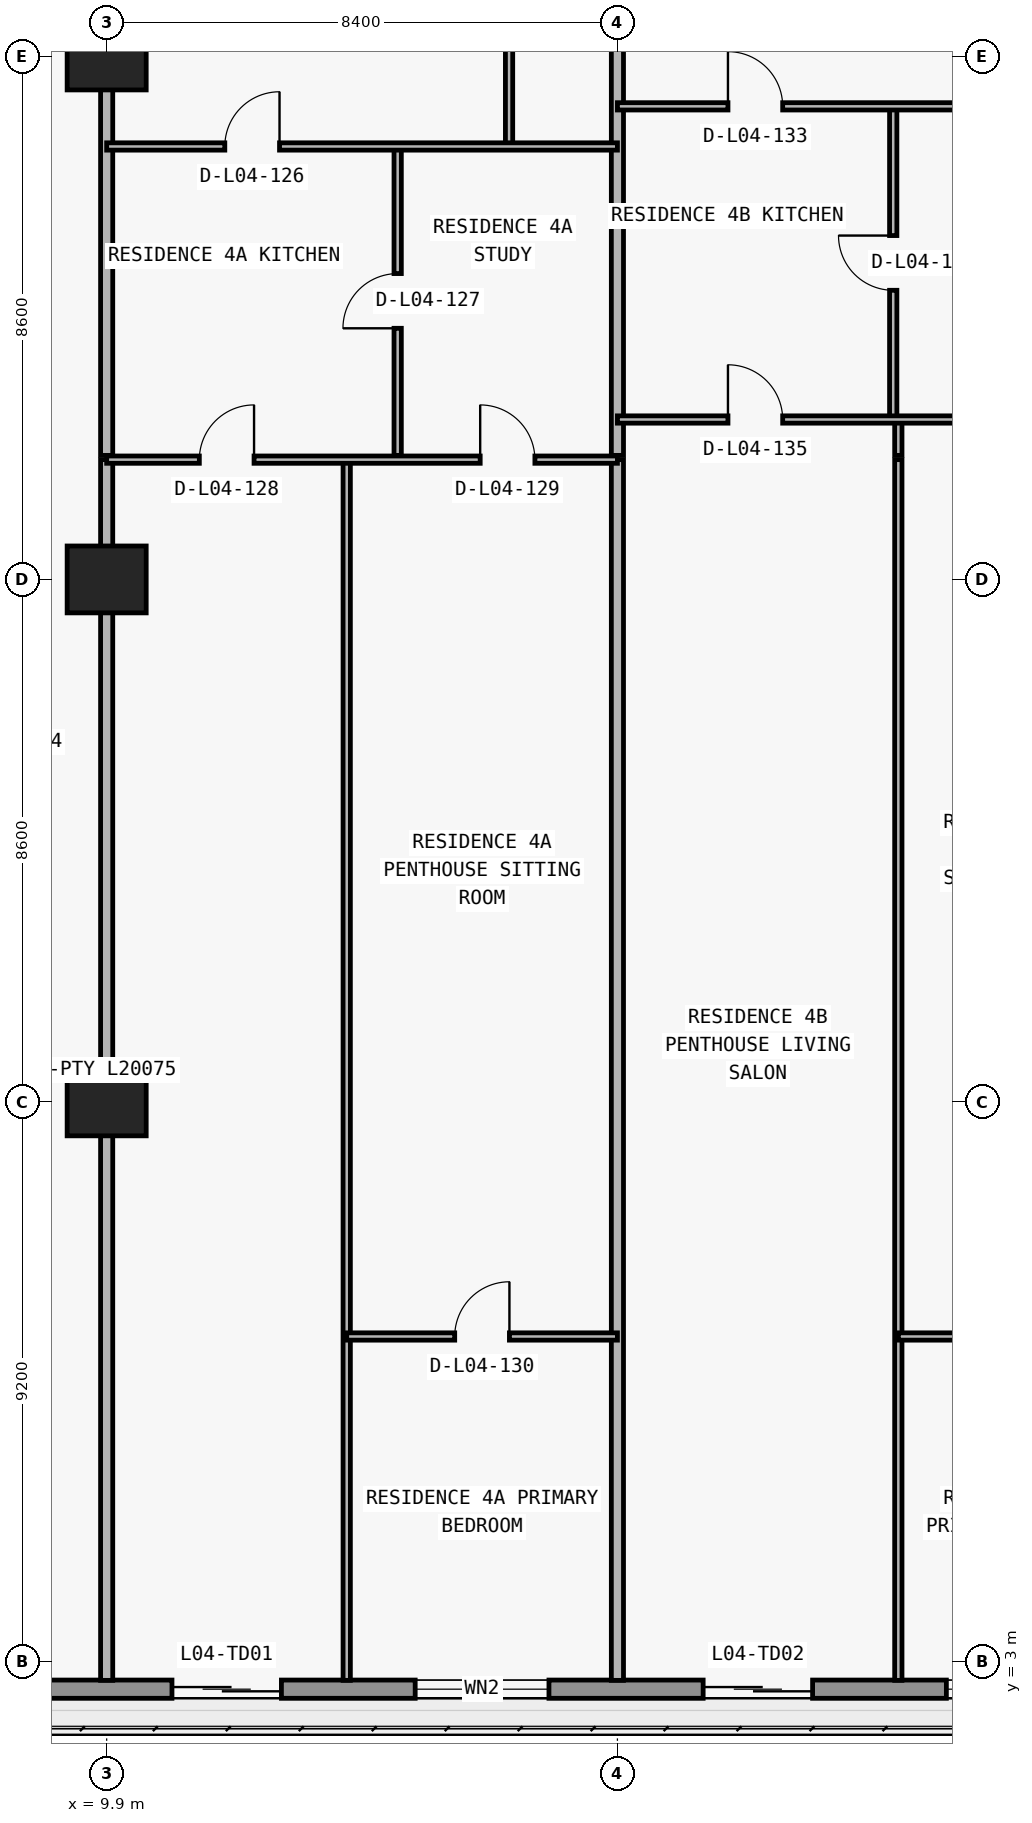
"""IFC4 building model, lengths in metres.
Left out: names, types, materials, properties, quantities, classifications, styles, units other than length and angle.
Written with IfcOpenShell. Run it as: python <this file> out.ifc"""

import sys

from ifc_helpers import new_model, si_unit, direction, frame, frame_2d, origin, origin_2d, place, context, subcontext, project, spatial, rectangle, extrude, element, fill, save


model = new_model("IFC4")
c1 = context("Model", 3, precision=1e-05, world=origin(), true_north=direction((0.0, 1.0)))
c2 = subcontext(c1, "Body", "Model", "MODEL_VIEW")
j1 = project(units=[si_unit("LENGTHUNIT", "METRE"), si_unit("PLANEANGLEUNIT", "RADIAN")], contexts=[c1])
p1 = place(None, origin())
s1 = spatial("IfcSite", under=j1, at=p1, CompositionType="ELEMENT")
p2 = place(p1, origin())
s2 = spatial("IfcBuilding", under=s1, at=p2, CompositionType="ELEMENT")
p3 = place(p2, frame((0.0, 0.0, 19.8)))
s3 = spatial("IfcBuildingStorey", under=s2, at=p3, CompositionType="ELEMENT", Elevation=19.8)
for number, where, z_axis, x_axis in (
    (1, (9.9, 12.2, 0.0), (0.0, 0.0, 1.0), (1.0, 0.0, 0.0)),
    (2, (9.9, 20.8, 0.0), (0.0, 0.0, 1.0), (1.0, 0.0, 0.0)),
    (3, (9.9, 29.4, 0.0), (0.0, 0.0, 1.0), (1.0, 0.0, 0.0)),
):
    element("IfcColumn", number, at=place(p3, frame(where, z_axis=z_axis, x_axis=x_axis)), inside=s3, PredefinedType="COLUMN", context=c2, shape_type="SweptSolid", body=[
        extrude(rectangle(XDim=1.3, YDim=1.1, at=origin_2d()), origin(), (0.0, 0.0, 1.0), 4.45),
    ])
p4 = place(p3, frame((74.15, 2.55, 0.0), z_axis=(0.0, 0.0, 1.0), x_axis=(-1.0, 0.0, 0.0)))
e4 = element("IfcWall", 4, at=p4, inside=s3, PredefinedType="STANDARD", context=c2, shape_type="SweptSolid", body=[
    extrude(rectangle(XDim=70.5, YDim=0.3, at=frame_2d((35.25, 0.0))), origin(), (0.0, 0.0, 1.0), 4.45),
])
p5 = place(p4, frame((65.875, 0.0, 0.85)))
e5 = element("IfcOpeningElement", 5, at=p5, cuts=e4, PredefinedType="OPENING", context=c2, shape_type="SweptSolid", body=[
    extrude(rectangle(XDim=3.0, YDim=2.4, at=frame_2d((1.5, 1.2))), frame((0.0, 0.16, 0.0), z_axis=(0.0, -1.0, 0.0), x_axis=(1.0, 0.0, 0.0)), (0.0, 0.0, 1.0), 0.32),
])
p6 = place(p4, frame((61.376, 0.0, 0.0)))
e6 = element("IfcOpeningElement", 6, at=p6, cuts=e4, PredefinedType="OPENING", context=c2, shape_type="SweptSolid", body=[
    extrude(rectangle(XDim=1.8, YDim=2.3, at=frame_2d((0.9, 1.15))), frame((0.0, 0.16, 0.0), z_axis=(0.0, -1.0, 0.0), x_axis=(1.0, 0.0, 0.0)), (0.0, 0.0, 1.0), 0.32),
])
p7 = place(p4, frame((56.976, 0.0, 0.85)))
e7 = element("IfcOpeningElement", 7, at=p7, cuts=e4, PredefinedType="OPENING", context=c2, shape_type="SweptSolid", body=[
    extrude(rectangle(XDim=2.2, YDim=1.55, at=frame_2d((1.1, 0.775))), frame((0.0, 0.16, 0.0), z_axis=(0.0, -1.0, 0.0), x_axis=(1.0, 0.0, 0.0)), (0.0, 0.0, 1.0), 0.32),
])
p8 = place(p4, frame((52.64, 0.0, 0.0)))
e8 = element("IfcOpeningElement", 8, at=p8, cuts=e4, PredefinedType="OPENING", context=c2, shape_type="SweptSolid", body=[
    extrude(rectangle(XDim=1.8, YDim=2.3, at=frame_2d((0.9, 1.15))), frame((0.0, 0.16, 0.0), z_axis=(0.0, -1.0, 0.0), x_axis=(1.0, 0.0, 0.0)), (0.0, 0.0, 1.0), 0.32),
])
p9 = place(p4, frame((48.24, 0.0, 0.85)))
e9 = element("IfcOpeningElement", 9, at=p9, cuts=e4, PredefinedType="OPENING", context=c2, shape_type="SweptSolid", body=[
    extrude(rectangle(XDim=2.2, YDim=1.55, at=frame_2d((1.1, 0.775))), frame((0.0, 0.16, 0.0), z_axis=(0.0, -1.0, 0.0), x_axis=(1.0, 0.0, 0.0)), (0.0, 0.0, 1.0), 0.32),
])
p10 = place(p4, frame((34.35, 0.0, 0.0)))
e10 = element("IfcOpeningElement", 10, at=p10, cuts=e4, PredefinedType="OPENING", context=c2, shape_type="SweptSolid", body=[
    extrude(rectangle(XDim=1.8, YDim=2.3, at=frame_2d((0.9, 1.15))), frame((0.0, 0.16, 0.0), z_axis=(0.0, -1.0, 0.0), x_axis=(1.0, 0.0, 0.0)), (0.0, 0.0, 1.0), 0.32),
])
p11 = place(p4, frame((17.95, 0.0, 0.0)))
e11 = element("IfcOpeningElement", 11, at=p11, cuts=e4, PredefinedType="OPENING", context=c2, shape_type="SweptSolid", body=[
    extrude(rectangle(XDim=1.8, YDim=2.3, at=frame_2d((0.9, 1.15))), frame((0.0, 0.16, 0.0), z_axis=(0.0, -1.0, 0.0), x_axis=(1.0, 0.0, 0.0)), (0.0, 0.0, 1.0), 0.32),
])
p12 = place(p4, frame((9.35, 0.0, 0.85)))
e12 = element("IfcOpeningElement", 12, at=p12, cuts=e4, PredefinedType="OPENING", context=c2, shape_type="SweptSolid", body=[
    extrude(rectangle(XDim=2.2, YDim=1.55, at=frame_2d((1.1, 0.775))), frame((0.0, 0.16, 0.0), z_axis=(0.0, -1.0, 0.0), x_axis=(1.0, 0.0, 0.0)), (0.0, 0.0, 1.0), 0.32),
])
p13 = place(p4, frame((1.625, 0.0, 0.85)))
e13 = element("IfcOpeningElement", 13, at=p13, cuts=e4, PredefinedType="OPENING", context=c2, shape_type="SweptSolid", body=[
    extrude(rectangle(XDim=3.0, YDim=2.4, at=frame_2d((1.5, 1.2))), frame((0.0, 0.16, 0.0), z_axis=(0.0, -1.0, 0.0), x_axis=(1.0, 0.0, 0.0)), (0.0, 0.0, 1.0), 0.32),
])
p14 = place(p3, frame((9.9, 2.695, 0.0), z_axis=(0.0, 0.0, 1.0), x_axis=(0.0, 1.0, 0.0)))
e14 = element("IfcWall", 14, at=p14, inside=s3, PredefinedType="PARTITIONING", context=c2, shape_type="SweptSolid", body=[
    extrude(rectangle(XDim=20.075, YDim=0.2, at=frame_2d((10.038, 0.0))), origin(), (0.0, 0.0, 1.0), 3.014),
])
p15 = place(p3, frame((9.9, 22.84, 0.0), z_axis=(0.0, 0.0, 1.0), x_axis=(0.0, 1.0, 0.0)))
e15 = element("IfcWall", 15, at=p15, inside=s3, PredefinedType="PARTITIONING", context=c2, shape_type="SweptSolid", body=[
    extrude(rectangle(XDim=10.86, YDim=0.2, at=frame_2d((5.43, 0.0))), origin(), (0.0, 0.0, 1.0), 3.414),
])
p16 = place(p3, frame((13.848, 2.695, 0.0), z_axis=(0.0, 0.0, 1.0), x_axis=(0.0, 1.0, 0.0)))
e16 = element("IfcWall", 16, at=p16, inside=s3, PredefinedType="PARTITIONING", context=c2, shape_type="SweptSolid", body=[
    extrude(rectangle(XDim=20.075, YDim=0.12, at=frame_2d((10.038, 0.0))), origin(), (0.0, 0.0, 1.0), 4.05),
])
p17 = place(p3, frame((14.686, 22.84, 0.0), z_axis=(0.0, 0.0, 1.0), x_axis=(0.0, 1.0, 0.0)))
e17 = element("IfcWall", 17, at=p17, inside=s3, PredefinedType="PARTITIONING", context=c2, shape_type="SweptSolid", body=[
    extrude(rectangle(XDim=5.08, YDim=0.12, at=frame_2d((2.54, 0.0))), origin(), (0.0, 0.0, 1.0), 4.45),
])
p18 = place(p17, frame((2.09, 0.0, 0.0)))
e18 = element("IfcOpeningElement", 18, at=p18, cuts=e17, PredefinedType="OPENING", context=c2, shape_type="SweptSolid", body=[
    extrude(rectangle(XDim=0.9, YDim=2.15, at=frame_2d((0.45, 1.075))), frame((0.0, 0.07, 0.0), z_axis=(0.0, -1.0, 0.0), x_axis=(1.0, 0.0, 0.0)), (0.0, 0.0, 1.0), 0.14),
])
p19 = place(p3, frame((16.518, 27.92, 0.0), z_axis=(0.0, 0.0, 1.0), x_axis=(0.0, 1.0, 0.0)))
e19 = element("IfcWall", 19, at=p19, inside=s3, PredefinedType="PARTITIONING", context=c2, shape_type="SweptSolid", body=[
    extrude(rectangle(XDim=5.78, YDim=0.12, at=frame_2d((2.89, 0.0))), origin(), (0.0, 0.0, 1.0), 3.823),
])
p20 = place(p19, frame((2.465, 0.0, 0.0)))
e20 = element("IfcOpeningElement", 20, at=p20, cuts=e19, PredefinedType="OPENING", context=c2, shape_type="SweptSolid", body=[
    extrude(rectangle(XDim=0.85, YDim=2.1, at=frame_2d((0.425, 1.05))), frame((0.0, 0.07, 0.0), z_axis=(0.0, -1.0, 0.0), x_axis=(1.0, 0.0, 0.0)), (0.0, 0.0, 1.0), 0.14),
])
p21 = place(p3, frame((18.3, 2.695, 0.0), z_axis=(0.0, 0.0, 1.0), x_axis=(0.0, 1.0, 0.0)))
e21 = element("IfcWall", 21, at=p21, inside=s3, PredefinedType="PARTITIONING", context=c2, shape_type="SweptSolid", body=[
    extrude(rectangle(XDim=20.075, YDim=0.2, at=frame_2d((10.038, 0.0))), origin(), (0.0, 0.0, 1.0), 4.05),
])
p22 = place(p3, frame((18.3, 22.84, 0.0), z_axis=(0.0, 0.0, 1.0), x_axis=(0.0, 1.0, 0.0)))
e22 = element("IfcWall", 22, at=p22, inside=s3, PredefinedType="PARTITIONING", context=c2, shape_type="SweptSolid", body=[
    extrude(rectangle(XDim=10.86, YDim=0.2, at=frame_2d((5.43, 0.0))), origin(), (0.0, 0.0, 1.0), 4.45),
])
p23 = place(p3, frame((22.836, 23.43, 0.0), z_axis=(0.0, 0.0, 1.0), x_axis=(0.0, 1.0, 0.0)))
e23 = element("IfcWall", 23, at=p23, inside=s3, PredefinedType="PARTITIONING", context=c2, shape_type="SweptSolid", body=[
    extrude(rectangle(XDim=5.15, YDim=0.12, at=frame_2d((2.575, 0.0))), origin(), (0.0, 0.0, 1.0), 4.45),
])
p24 = place(p23, frame((2.125, 0.0, 0.0)))
e24 = element("IfcOpeningElement", 24, at=p24, cuts=e23, PredefinedType="OPENING", context=c2, shape_type="SweptSolid", body=[
    extrude(rectangle(XDim=0.9, YDim=2.15, at=frame_2d((0.45, 1.075))), frame((0.0, 0.07, 0.0), z_axis=(0.0, -1.0, 0.0), x_axis=(1.0, 0.0, 0.0)), (0.0, 0.0, 1.0), 0.14),
])
p25 = place(p3, frame((22.92, 2.695, 0.0), z_axis=(0.0, 0.0, 1.0), x_axis=(0.0, 1.0, 0.0)))
e25 = element("IfcWall", 25, at=p25, inside=s3, PredefinedType="PARTITIONING", context=c2, shape_type="SweptSolid", body=[
    extrude(rectangle(XDim=20.075, YDim=0.12, at=frame_2d((10.038, 0.0))), origin(), (0.0, 0.0, 1.0), 4.05),
])
p26 = place(p3, frame((22.92, 22.84, 0.0), z_axis=(0.0, 0.0, 1.0), x_axis=(0.0, 1.0, 0.0)))
e26 = element("IfcWall", 26, at=p26, inside=s3, PredefinedType="PARTITIONING", context=c2, shape_type="SweptSolid", body=[
    extrude(rectangle(XDim=0.585, YDim=0.12, at=frame_2d((0.292, 0.0))), origin(), (0.0, 0.0, 1.0), 4.45),
])
p27 = place(p3, frame((13.848, 8.35, 0.0), z_axis=(0.0, 0.0, 1.0), x_axis=(1.0, 0.0, 0.0)))
e27 = element("IfcWall", 27, at=p27, inside=s3, PredefinedType="PARTITIONING", context=c2, shape_type="SweptSolid", body=[
    extrude(rectangle(XDim=4.452, YDim=0.12, at=frame_2d((2.226, 0.0))), origin(), (0.0, 0.0, 1.0), 4.45),
])
p28 = place(p27, frame((1.776, 0.0, 0.0)))
e28 = element("IfcOpeningElement", 28, at=p28, cuts=e27, PredefinedType="OPENING", context=c2, shape_type="SweptSolid", body=[
    extrude(rectangle(XDim=0.9, YDim=2.15, at=frame_2d((0.45, 1.075))), frame((0.0, 0.07, 0.0), z_axis=(0.0, -1.0, 0.0), x_axis=(1.0, 0.0, 0.0)), (0.0, 0.0, 1.0), 0.14),
])
p29 = place(p3, frame((22.92, 8.35, 0.0), z_axis=(0.0, 0.0, 1.0), x_axis=(1.0, 0.0, 0.0)))
e29 = element("IfcWall", 29, at=p29, inside=s3, PredefinedType="PARTITIONING", context=c2, shape_type="SweptSolid", body=[
    extrude(rectangle(XDim=3.73, YDim=0.12, at=frame_2d((1.865, 0.0))), origin(), (0.0, 0.0, 1.0), 4.45),
])
p30 = place(p29, frame((1.415, 0.0, 0.0)))
e30 = element("IfcOpeningElement", 30, at=p30, cuts=e29, PredefinedType="OPENING", context=c2, shape_type="SweptSolid", body=[
    extrude(rectangle(XDim=0.9, YDim=2.15, at=frame_2d((0.45, 1.075))), frame((0.0, 0.07, 0.0), z_axis=(0.0, -1.0, 0.0), x_axis=(1.0, 0.0, 0.0)), (0.0, 0.0, 1.0), 0.14),
])
p31 = place(p3, frame((9.9, 22.77, 0.0), z_axis=(0.0, 0.0, 1.0), x_axis=(1.0, 0.0, 0.0)))
e31 = element("IfcWall", 31, at=p31, inside=s3, PredefinedType="PARTITIONING", context=c2, shape_type="SweptSolid", body=[
    extrude(rectangle(XDim=8.4, YDim=0.12, at=frame_2d((4.2, 0.0))), origin(), (0.0, 0.0, 1.0), 4.45),
])
p32 = place(p31, frame((1.524, 0.0, 0.0)))
e32 = element("IfcOpeningElement", 32, at=p32, cuts=e31, PredefinedType="OPENING", context=c2, shape_type="SweptSolid", body=[
    extrude(rectangle(XDim=0.9, YDim=2.15, at=frame_2d((0.45, 1.075))), frame((0.0, 0.07, 0.0), z_axis=(0.0, -1.0, 0.0), x_axis=(1.0, 0.0, 0.0)), (0.0, 0.0, 1.0), 0.14),
])
p33 = place(p31, frame((6.143, 0.0, 0.0)))
e33 = element("IfcOpeningElement", 33, at=p33, cuts=e31, PredefinedType="OPENING", context=c2, shape_type="SweptSolid", body=[
    extrude(rectangle(XDim=0.9, YDim=2.15, at=frame_2d((0.45, 1.075))), frame((0.0, 0.07, 0.0), z_axis=(0.0, -1.0, 0.0), x_axis=(1.0, 0.0, 0.0)), (0.0, 0.0, 1.0), 0.14),
])
p34 = place(p3, frame((18.3, 23.43, 0.0), z_axis=(0.0, 0.0, 1.0), x_axis=(1.0, 0.0, 0.0)))
e34 = element("IfcWall", 34, at=p34, inside=s3, PredefinedType="PARTITIONING", context=c2, shape_type="SweptSolid", body=[
    extrude(rectangle(XDim=8.35, YDim=0.12, at=frame_2d((4.175, 0.0))), origin(), (0.0, 0.0, 1.0), 4.45),
])
p35 = place(p34, frame((1.818, 0.0, 0.0)))
e35 = element("IfcOpeningElement", 35, at=p35, cuts=e34, PredefinedType="OPENING", context=c2, shape_type="SweptSolid", body=[
    extrude(rectangle(XDim=0.9, YDim=2.15, at=frame_2d((0.45, 1.075))), frame((0.0, 0.07, 0.0), z_axis=(0.0, -1.0, 0.0), x_axis=(1.0, 0.0, 0.0)), (0.0, 0.0, 1.0), 0.14),
])
p36 = place(p34, frame((6.035, 0.0, 0.0)))
e36 = element("IfcOpeningElement", 36, at=p36, cuts=e34, PredefinedType="OPENING", context=c2, shape_type="SweptSolid", body=[
    extrude(rectangle(XDim=0.9, YDim=2.15, at=frame_2d((0.45, 1.075))), frame((0.0, 0.07, 0.0), z_axis=(0.0, -1.0, 0.0), x_axis=(1.0, 0.0, 0.0)), (0.0, 0.0, 1.0), 0.14),
])
p37 = place(p3, frame((9.9, 27.92, 0.0), z_axis=(0.0, 0.0, 1.0), x_axis=(1.0, 0.0, 0.0)))
e37 = element("IfcWall", 37, at=p37, inside=s3, PredefinedType="PARTITIONING", context=c2, shape_type="SweptSolid", body=[
    extrude(rectangle(XDim=8.4, YDim=0.12, at=frame_2d((4.2, 0.0))), origin(), (0.0, 0.0, 1.0), 4.45),
])
p38 = place(p37, frame((1.943, 0.0, 0.0)))
e38 = element("IfcOpeningElement", 38, at=p38, cuts=e37, PredefinedType="OPENING", context=c2, shape_type="SweptSolid", body=[
    extrude(rectangle(XDim=0.9, YDim=2.15, at=frame_2d((0.45, 1.075))), frame((0.0, 0.07, 0.0), z_axis=(0.0, -1.0, 0.0), x_axis=(1.0, 0.0, 0.0)), (0.0, 0.0, 1.0), 0.14),
])
p39 = place(p3, frame((18.3, 28.58, 0.0), z_axis=(0.0, 0.0, 1.0), x_axis=(1.0, 0.0, 0.0)))
e39 = element("IfcWall", 39, at=p39, inside=s3, PredefinedType="PARTITIONING", context=c2, shape_type="SweptSolid", body=[
    extrude(rectangle(XDim=8.35, YDim=0.12, at=frame_2d((4.175, 0.0))), origin(), (0.0, 0.0, 1.0), 4.45),
])
p40 = place(p39, frame((1.818, 0.0, 0.0)))
e40 = element("IfcOpeningElement", 40, at=p40, cuts=e39, PredefinedType="OPENING", context=c2, shape_type="SweptSolid", body=[
    extrude(rectangle(XDim=0.9, YDim=2.15, at=frame_2d((0.45, 1.075))), frame((0.0, 0.07, 0.0), z_axis=(0.0, -1.0, 0.0), x_axis=(1.0, 0.0, 0.0)), (0.0, 0.0, 1.0), 0.14),
])
p41 = place(p6, origin())
e41 = element("IfcDoor", 41, at=p41, inside=s3, OperationType="DOUBLE_DOOR_SLIDING", PredefinedType="DOOR", context=c2, shape_type="SweptSolid", body=[
    extrude(rectangle(XDim=1.8, YDim=2.3, at=frame_2d((0.9, 1.15))), frame((0.0, 0.025, 0.0), z_axis=(0.0, -1.0, 0.0), x_axis=(1.0, 0.0, 0.0)), (0.0, 0.0, 1.0), 0.05),
])
fill(e6, e41)
p42 = place(p7, origin())
e42 = element("IfcWindow", 42, at=p42, inside=s3, PartitioningType="SINGLE_PANEL", PredefinedType="WINDOW", context=c2, shape_type="SweptSolid", body=[
    extrude(rectangle(XDim=2.2, YDim=1.55, at=frame_2d((1.1, 0.775))), frame((0.0, 0.03, 0.0), z_axis=(0.0, -1.0, 0.0), x_axis=(1.0, 0.0, 0.0)), (0.0, 0.0, 1.0), 0.06),
])
fill(e7, e42)
p43 = place(p8, origin())
e43 = element("IfcDoor", 43, at=p43, inside=s3, OperationType="DOUBLE_DOOR_SLIDING", PredefinedType="DOOR", context=c2, shape_type="SweptSolid", body=[
    extrude(rectangle(XDim=1.8, YDim=2.3, at=frame_2d((0.9, 1.15))), frame((0.0, 0.025, 0.0), z_axis=(0.0, -1.0, 0.0), x_axis=(1.0, 0.0, 0.0)), (0.0, 0.0, 1.0), 0.05),
])
fill(e8, e43)
p44 = place(p9, origin())
e44 = element("IfcWindow", 44, at=p44, inside=s3, PartitioningType="SINGLE_PANEL", PredefinedType="WINDOW", context=c2, shape_type="SweptSolid", body=[
    extrude(rectangle(XDim=2.2, YDim=1.55, at=frame_2d((1.1, 0.775))), frame((0.0, 0.03, 0.0), z_axis=(0.0, -1.0, 0.0), x_axis=(1.0, 0.0, 0.0)), (0.0, 0.0, 1.0), 0.06),
])
fill(e9, e44)
p45 = place(p38, origin())
e45 = element("IfcDoor", 45, at=p45, inside=s3, OperationType="SINGLE_SWING_RIGHT", PredefinedType="DOOR", context=c2, shape_type="SweptSolid", body=[
    extrude(rectangle(XDim=0.9, YDim=2.15, at=frame_2d((0.45, 1.075))), frame((0.0, 0.025, 0.0), z_axis=(0.0, -1.0, 0.0), x_axis=(1.0, 0.0, 0.0)), (0.0, 0.0, 1.0), 0.05),
])
fill(e38, e45)
p46 = place(p18, origin())
e46 = element("IfcDoor", 46, at=p46, inside=s3, OperationType="SINGLE_SWING_LEFT", PredefinedType="DOOR", context=c2, shape_type="SweptSolid", body=[
    extrude(rectangle(XDim=0.9, YDim=2.15, at=frame_2d((0.45, 1.075))), frame((0.0, 0.025, 0.0), z_axis=(0.0, -1.0, 0.0), x_axis=(1.0, 0.0, 0.0)), (0.0, 0.0, 1.0), 0.05),
])
fill(e18, e46)
p47 = place(p32, origin())
e47 = element("IfcDoor", 47, at=p47, inside=s3, OperationType="SINGLE_SWING_RIGHT", PredefinedType="DOOR", context=c2, shape_type="SweptSolid", body=[
    extrude(rectangle(XDim=0.9, YDim=2.15, at=frame_2d((0.45, 1.075))), frame((0.0, 0.025, 0.0), z_axis=(0.0, -1.0, 0.0), x_axis=(1.0, 0.0, 0.0)), (0.0, 0.0, 1.0), 0.05),
])
fill(e32, e47)
p48 = place(p33, origin())
e48 = element("IfcDoor", 48, at=p48, inside=s3, OperationType="SINGLE_SWING_LEFT", PredefinedType="DOOR", context=c2, shape_type="SweptSolid", body=[
    extrude(rectangle(XDim=0.9, YDim=2.15, at=frame_2d((0.45, 1.075))), frame((0.0, 0.025, 0.0), z_axis=(0.0, -1.0, 0.0), x_axis=(1.0, 0.0, 0.0)), (0.0, 0.0, 1.0), 0.05),
])
fill(e33, e48)
p49 = place(p28, origin())
e49 = element("IfcDoor", 49, at=p49, inside=s3, OperationType="SINGLE_SWING_RIGHT", PredefinedType="DOOR", context=c2, shape_type="SweptSolid", body=[
    extrude(rectangle(XDim=0.9, YDim=2.15, at=frame_2d((0.45, 1.075))), frame((0.0, 0.025, 0.0), z_axis=(0.0, -1.0, 0.0), x_axis=(1.0, 0.0, 0.0)), (0.0, 0.0, 1.0), 0.05),
])
fill(e28, e49)
p50 = place(p40, origin())
e50 = element("IfcDoor", 50, at=p50, inside=s3, OperationType="SINGLE_SWING_LEFT", PredefinedType="DOOR", context=c2, shape_type="SweptSolid", body=[
    extrude(rectangle(XDim=0.9, YDim=2.15, at=frame_2d((0.45, 1.075))), frame((0.0, 0.025, 0.0), z_axis=(0.0, -1.0, 0.0), x_axis=(1.0, 0.0, 0.0)), (0.0, 0.0, 1.0), 0.05),
])
fill(e40, e50)
p51 = place(p24, origin())
e51 = element("IfcDoor", 51, at=p51, inside=s3, OperationType="SINGLE_SWING_RIGHT", PredefinedType="DOOR", context=c2, shape_type="SweptSolid", body=[
    extrude(rectangle(XDim=0.9, YDim=2.15, at=frame_2d((0.45, 1.075))), frame((0.0, 0.025, 0.0), z_axis=(0.0, -1.0, 0.0), x_axis=(1.0, 0.0, 0.0)), (0.0, 0.0, 1.0), 0.05),
])
fill(e24, e51)
p52 = place(p35, origin())
e52 = element("IfcDoor", 52, at=p52, inside=s3, OperationType="SINGLE_SWING_LEFT", PredefinedType="DOOR", context=c2, shape_type="SweptSolid", body=[
    extrude(rectangle(XDim=0.9, YDim=2.15, at=frame_2d((0.45, 1.075))), frame((0.0, 0.025, 0.0), z_axis=(0.0, -1.0, 0.0), x_axis=(1.0, 0.0, 0.0)), (0.0, 0.0, 1.0), 0.05),
])
fill(e35, e52)
save(model, sys.argv[1])
